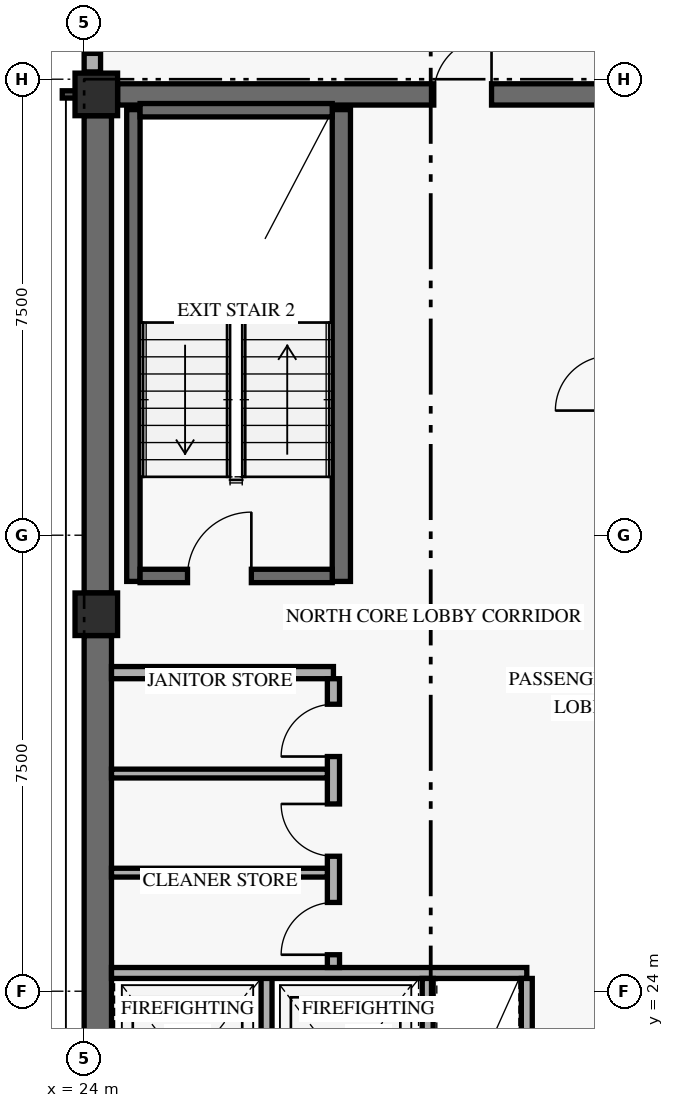
"""IFC4 building model, lengths in metres.
Left out: names, types, materials, properties, quantities, classifications, styles, units other than length and angle.
Written with IfcOpenShell. Run it as: python <this file> out.ifc"""

import sys

from ifc_helpers import new_model, si_unit, direction, frame, frame_2d, origin, origin_2d, place, context, subcontext, project, spatial, rectangle, extrude, element, fill, save


model = new_model("IFC4")
c1 = context("Model", 3, precision=1e-05, world=origin(), true_north=direction((0.0, 1.0)))
c2 = subcontext(c1, "Body", "Model", "MODEL_VIEW")
j1 = project(units=[si_unit("LENGTHUNIT", "METRE"), si_unit("PLANEANGLEUNIT", "RADIAN")], contexts=[c1])
p1 = place(None, origin())
s1 = spatial("IfcSite", under=j1, at=p1, CompositionType="ELEMENT")
p2 = place(p1, origin())
s2 = spatial("IfcBuilding", under=s1, at=p2, CompositionType="ELEMENT")
p3 = place(p2, frame((0.0, 0.0, 278.4)))
s3 = spatial("IfcBuildingStorey", under=s2, at=p3, CompositionType="ELEMENT", Elevation=278.4)
p4 = place(p3, frame((24.225, 17.9, 0.0), z_axis=(0.0, 0.0, 1.0), x_axis=(0.0, 1.0, 0.0)))
e1 = element("IfcWall", 1, at=p4, inside=s3, PredefinedType="SHEAR", context=c2, shape_type="SweptSolid", body=[
    extrude(rectangle(XDim=11.95, YDim=0.45, at=frame_2d((5.975, 0.0))), origin(), (0.0, 0.0, 1.0), 2.761),
])
p5 = place(p3, frame((24.225, 30.55, 0.0), z_axis=(0.0, 0.0, 1.0), x_axis=(0.0, 1.0, 0.0)))
e2 = element("IfcWall", 2, at=p5, inside=s3, PredefinedType="SHEAR", context=c2, shape_type="SweptSolid", body=[
    extrude(rectangle(XDim=7.85, YDim=0.45, at=frame_2d((3.925, 0.0))), origin(), (0.0, 0.0, 1.0), 2.761),
])
p6 = place(p3, frame((24.55, 38.75, 0.0), z_axis=(0.0, 0.0, 1.0), x_axis=(1.0, 0.0, 0.0)))
e3 = element("IfcWall", 3, at=p6, inside=s3, PredefinedType="SHEAR", context=c2, shape_type="SweptSolid", body=[
    extrude(rectangle(XDim=10.3, YDim=0.35, at=frame_2d((5.15, 0.0))), origin(), (0.0, 0.0, 1.0), 3.3),
])
p7 = place(p6, frame((5.2, 0.0, 0.0)))
e4 = element("IfcOpeningElement", 4, at=p7, cuts=e3, PredefinedType="OPENING", context=c2, shape_type="SweptSolid", body=[
    extrude(rectangle(XDim=0.95, YDim=2.15, at=frame_2d((0.475, 1.075))), frame((0.0, 0.185, 0.0), z_axis=(0.0, -1.0, 0.0), x_axis=(1.0, 0.0, 0.0)), (0.0, 0.0, 1.0), 0.37),
])
p8 = place(p3, frame((24.81, 30.74, 0.0), z_axis=(0.0, 0.0, 1.0), x_axis=(0.0, 1.0, 0.0)))
e5 = element("IfcWall", 5, at=p8, inside=s3, PredefinedType="SHEAR", context=c2, shape_type="SweptSolid", body=[
    extrude(rectangle(XDim=7.76, YDim=0.22, at=frame_2d((3.88, 0.0))), origin(), (0.0, 0.0, 1.0), 3.3),
])
p9 = place(p3, frame((28.23, 30.74, 0.0), z_axis=(0.0, 0.0, 1.0), x_axis=(0.0, 1.0, 0.0)))
e6 = element("IfcWall", 6, at=p9, inside=s3, PredefinedType="SHEAR", context=c2, shape_type="SweptSolid", body=[
    extrude(rectangle(XDim=7.76, YDim=0.3, at=frame_2d((3.88, 0.0))), origin(), (0.0, 0.0, 1.0), 3.3),
])
p10 = place(p3, frame((24.92, 30.83, 0.0), z_axis=(0.0, 0.0, 1.0), x_axis=(1.0, 0.0, 0.0)))
e7 = element("IfcWall", 7, at=p10, inside=s3, PredefinedType="SHEAR", context=c2, shape_type="SweptSolid", body=[
    extrude(rectangle(XDim=3.16, YDim=0.22, at=frame_2d((1.58, 0.0))), origin(), (0.0, 0.0, 1.0), 3.3),
])
p11 = place(p10, frame((0.78, 0.0, 0.0)))
e8 = element("IfcOpeningElement", 8, at=p11, cuts=e7, PredefinedType="OPENING", context=c2, shape_type="SweptSolid", body=[
    extrude(rectangle(XDim=1.05, YDim=2.15, at=frame_2d((0.525, 1.075))), frame((0.0, 0.12, 0.0), z_axis=(0.0, -1.0, 0.0), x_axis=(1.0, 0.0, 0.0)), (0.0, 0.0, 1.0), 0.24),
])
p12 = place(p3, frame((24.92, 38.49, 0.0), z_axis=(0.0, 0.0, 1.0), x_axis=(1.0, 0.0, 0.0)))
e9 = element("IfcWall", 9, at=p12, inside=s3, PredefinedType="SHEAR", context=c2, shape_type="SweptSolid", body=[
    extrude(rectangle(XDim=3.16, YDim=0.22, at=frame_2d((1.58, 0.0))), origin(), (0.0, 0.0, 1.0), 3.3),
])
for number, where, z_axis, x_axis in (
    (10, (24.2, 30.2, 0.0), (0.0, 0.0, 1.0), (1.0, 0.0, 0.0)),
    (11, (24.2, 38.75, 0.0), (0.0, 0.0, 1.0), (1.0, 0.0, 0.0)),
):
    element("IfcColumn", number, at=place(p3, frame(where, z_axis=z_axis, x_axis=x_axis)), inside=s3, PredefinedType="COLUMN", context=c2, shape_type="SweptSolid", body=[
        extrude(rectangle(XDim=0.7, YDim=0.7, at=origin_2d()), origin(), (0.0, 0.0, 1.0), 3.6),
    ])
p13 = place(p3, frame((24.135, 39.12, 0.0), z_axis=(0.0, 0.0, 1.0), x_axis=(0.0, 1.0, 0.0)))
e12 = element("IfcWall", 12, at=p13, inside=s3, PredefinedType="SOLIDWALL", context=c2, shape_type="SweptSolid", body=[
    extrude(rectangle(XDim=1.56, YDim=0.27, at=frame_2d((0.78, 0.0))), origin(), (0.0, 0.0, 1.0), 2.743),
])
p14 = place(p13, frame((0.305, 0.0, 0.85)))
e13 = element("IfcOpeningElement", 13, at=p14, cuts=e12, PredefinedType="OPENING", context=c2, shape_type="SweptSolid", body=[
    extrude(rectangle(XDim=0.95, YDim=1.5, at=frame_2d((0.475, 0.75))), frame((0.0, 0.145, 0.0), z_axis=(0.0, -1.0, 0.0), x_axis=(1.0, 0.0, 0.0)), (0.0, 0.0, 1.0), 0.29),
])
p15 = place(p3, frame((27.0, 21.19, 0.0), z_axis=(0.0, 0.0, 1.0), x_axis=(0.0, 1.0, 0.0)))
e14 = element("IfcWall", 14, at=p15, inside=s3, PredefinedType="STANDARD", context=c2, shape_type="SweptSolid", body=[
    extrude(rectangle(XDim=3.11, YDim=0.18, at=frame_2d((1.555, 0.0))), origin(), (0.0, 0.0, 1.0), 3.3),
])
p16 = place(p3, frame((24.45, 24.3, 0.0), z_axis=(0.0, 0.0, 1.0), x_axis=(1.0, 0.0, 0.0)))
e15 = element("IfcWall", 15, at=p16, inside=s3, PredefinedType="STANDARD", context=c2, shape_type="SweptSolid", body=[
    extrude(rectangle(XDim=6.83, YDim=0.18, at=frame_2d((3.415, 0.0))), origin(), (0.0, 0.0, 1.0), 3.3),
])
for number, where, z_axis, x_axis in (
    (16, (29.65, 21.19, 0.0), (0.0, 0.0, 1.0), (0.0, 1.0, 0.0)),
    (17, (31.28, 21.19, 0.0), (0.0, 0.0, 1.0), (0.0, 1.0, 0.0)),
):
    element("IfcWall", number, at=place(p3, frame(where, z_axis=z_axis, x_axis=x_axis)), inside=s3, PredefinedType="STANDARD", context=c2, shape_type="SweptSolid", body=[
        extrude(rectangle(XDim=3.02, YDim=0.18, at=frame_2d((1.51, 0.0))), origin(), (0.0, 0.0, 1.0), 3.3),
    ])
p17 = place(p3, frame((24.45, 29.24, 0.0), z_axis=(0.0, 0.0, 1.0), x_axis=(1.0, 0.0, 0.0)))
e18 = element("IfcWall", 18, at=p17, inside=s3, PredefinedType="STANDARD", context=c2, shape_type="SweptSolid", body=[
    extrude(rectangle(XDim=3.65, YDim=0.2, at=frame_2d((1.825, 0.0))), origin(), (0.0, 0.0, 1.0), 3.3),
])
p18 = place(p3, frame((28.1, 24.39, 0.0), z_axis=(0.0, 0.0, 1.0), x_axis=(0.0, 1.0, 0.0)))
e19 = element("IfcWall", 19, at=p18, inside=s3, PredefinedType="STANDARD", context=c2, shape_type="SweptSolid", body=[
    extrude(rectangle(XDim=4.75, YDim=0.2, at=frame_2d((2.375, 0.0))), origin(), (0.0, 0.0, 1.0), 3.3),
])
p19 = place(p18, frame((0.21, 0.0, 0.0)))
e20 = element("IfcOpeningElement", 20, at=p19, cuts=e19, PredefinedType="OPENING", context=c2, shape_type="SweptSolid", body=[
    extrude(rectangle(XDim=0.86, YDim=2.1, at=frame_2d((0.43, 1.05))), frame((0.0, 0.11, 0.0), z_axis=(0.0, -1.0, 0.0), x_axis=(1.0, 0.0, 0.0)), (0.0, 0.0, 1.0), 0.22),
])
p20 = place(p18, frame((1.83, 0.0, 0.0)))
e21 = element("IfcOpeningElement", 21, at=p20, cuts=e19, PredefinedType="OPENING", context=c2, shape_type="SweptSolid", body=[
    extrude(rectangle(XDim=0.86, YDim=2.1, at=frame_2d((0.43, 1.05))), frame((0.0, 0.11, 0.0), z_axis=(0.0, -1.0, 0.0), x_axis=(1.0, 0.0, 0.0)), (0.0, 0.0, 1.0), 0.22),
])
p21 = place(p18, frame((3.47, 0.0, 0.0)))
e22 = element("IfcOpeningElement", 22, at=p21, cuts=e19, PredefinedType="OPENING", context=c2, shape_type="SweptSolid", body=[
    extrude(rectangle(XDim=0.86, YDim=2.1, at=frame_2d((0.43, 1.05))), frame((0.0, 0.11, 0.0), z_axis=(0.0, -1.0, 0.0), x_axis=(1.0, 0.0, 0.0)), (0.0, 0.0, 1.0), 0.22),
])
for number, where, z_axis, x_axis in (
    (23, (24.45, 25.95, 0.0), (0.0, 0.0, 1.0), (1.0, 0.0, 0.0)),
    (24, (24.45, 27.58, 0.0), (0.0, 0.0, 1.0), (1.0, 0.0, 0.0)),
):
    element("IfcWall", number, at=place(p3, frame(where, z_axis=z_axis, x_axis=x_axis)), inside=s3, PredefinedType="PARTITIONING", context=c2, shape_type="SweptSolid", body=[
        extrude(rectangle(XDim=3.55, YDim=0.145, at=frame_2d((1.775, 0.0))), origin(), (0.0, 0.0, 1.0), 3.3),
    ])
p22 = place(p14, origin())
e25 = element("IfcWindow", 25, at=p22, inside=s3, PartitioningType="SINGLE_PANEL", PredefinedType="WINDOW", context=c2, shape_type="SweptSolid", body=[
    extrude(rectangle(XDim=0.95, YDim=1.5, at=frame_2d((0.475, 0.75))), frame((0.0, 0.03, 0.0), z_axis=(0.0, -1.0, 0.0), x_axis=(1.0, 0.0, 0.0)), (0.0, 0.0, 1.0), 0.06),
])
fill(e13, e25)
p23 = place(p11, origin())
e26 = element("IfcDoor", 26, at=p23, inside=s3, OperationType="SINGLE_SWING_RIGHT", PredefinedType="DOOR", context=c2, shape_type="SweptSolid", body=[
    extrude(rectangle(XDim=1.05, YDim=2.15, at=frame_2d((0.525, 1.075))), frame((0.0, 0.025, 0.0), z_axis=(0.0, -1.0, 0.0), x_axis=(1.0, 0.0, 0.0)), (0.0, 0.0, 1.0), 0.05),
])
fill(e8, e26)
p24 = place(p19, origin())
e27 = element("IfcDoor", 27, at=p24, inside=s3, OperationType="SINGLE_SWING_LEFT", PredefinedType="DOOR", context=c2, shape_type="SweptSolid", body=[
    extrude(rectangle(XDim=0.86, YDim=2.1, at=frame_2d((0.43, 1.05))), frame((0.0, 0.025, 0.0), z_axis=(0.0, -1.0, 0.0), x_axis=(1.0, 0.0, 0.0)), (0.0, 0.0, 1.0), 0.05),
])
fill(e20, e27)
p25 = place(p20, origin())
e28 = element("IfcDoor", 28, at=p25, inside=s3, OperationType="SINGLE_SWING_RIGHT", PredefinedType="DOOR", context=c2, shape_type="SweptSolid", body=[
    extrude(rectangle(XDim=0.86, YDim=2.1, at=frame_2d((0.43, 1.05))), frame((0.0, 0.025, 0.0), z_axis=(0.0, -1.0, 0.0), x_axis=(1.0, 0.0, 0.0)), (0.0, 0.0, 1.0), 0.05),
])
fill(e21, e28)
p26 = place(p21, origin())
e29 = element("IfcDoor", 29, at=p26, inside=s3, OperationType="SINGLE_SWING_LEFT", PredefinedType="DOOR", context=c2, shape_type="SweptSolid", body=[
    extrude(rectangle(XDim=0.86, YDim=2.1, at=frame_2d((0.43, 1.05))), frame((0.0, 0.025, 0.0), z_axis=(0.0, -1.0, 0.0), x_axis=(1.0, 0.0, 0.0)), (0.0, 0.0, 1.0), 0.05),
])
fill(e22, e29)
p27 = place(p7, origin())
e30 = element("IfcDoor", 30, at=p27, inside=s3, OperationType="SINGLE_SWING_RIGHT", PredefinedType="DOOR", context=c2, shape_type="SweptSolid", body=[
    extrude(rectangle(XDim=0.95, YDim=2.15, at=frame_2d((0.475, 1.075))), frame((0.0, 0.025, 0.0), z_axis=(0.0, -1.0, 0.0), x_axis=(1.0, 0.0, 0.0)), (0.0, 0.0, 1.0), 0.05),
])
fill(e4, e30)
save(model, sys.argv[1])
